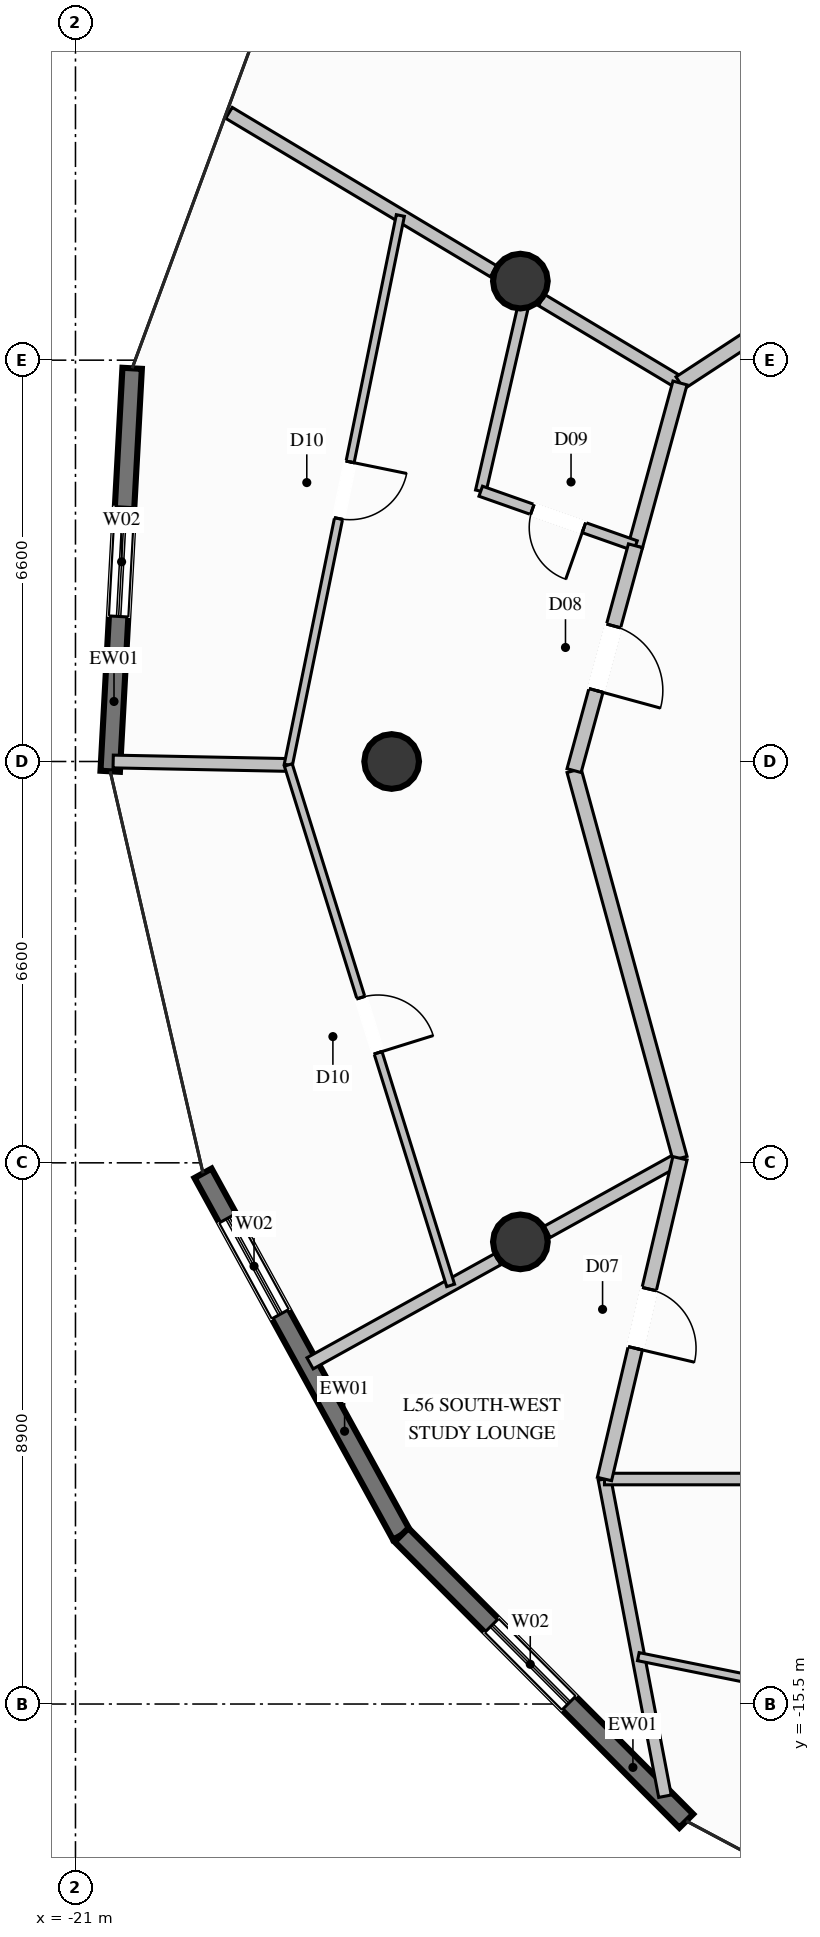
"""IFC4 building model, lengths in metres.
Left out: names, types, materials, properties, quantities, classifications, styles, units other than length and angle.
Written with IfcOpenShell. Run it as: python <this file> out.ifc"""

import sys

from ifc_helpers import new_model, si_unit, direction, frame, frame_2d, origin, origin_2d, place, context, subcontext, project, spatial, rectangle, circle, extrude, element, fill, save


model = new_model("IFC4")
c1 = context("Model", 3, precision=1e-05, world=origin(), true_north=direction((0.0, 1.0)))
c2 = subcontext(c1, "Body", "Model", "MODEL_VIEW")
j1 = project(units=[si_unit("LENGTHUNIT", "METRE"), si_unit("PLANEANGLEUNIT", "RADIAN")], contexts=[c1])
p1 = place(None, origin())
s1 = spatial("IfcSite", under=j1, at=p1, CompositionType="ELEMENT")
p2 = place(p1, origin())
s2 = spatial("IfcBuilding", under=s1, at=p2, CompositionType="ELEMENT")
p3 = place(p2, frame((0.0, 0.0, 216.4)))
s3 = spatial("IfcBuildingStorey", under=s2, at=p3, CompositionType="ELEMENT", Elevation=216.4)
for number, where, z_axis, x_axis in (
    (1, (-13.683, 7.9, 0.0), (0.0, 0.0, 1.0), (1.0, 0.0, 0.0)),
    (2, (-15.8, 0.0, 0.0), (0.0, 0.0, 1.0), (1.0, 0.0, 0.0)),
    (3, (-13.683, -7.9, 0.0), (0.0, 0.0, 1.0), (1.0, 0.0, 0.0)),
):
    element("IfcColumn", number, at=place(p3, frame(where, z_axis=z_axis, x_axis=x_axis)), inside=s3, PredefinedType="COLUMN", context=c2, shape_type="SweptSolid", body=[
        extrude(circle(Radius=0.45, at=origin_2d()), origin(), (0.0, 0.0, 1.0), 3.6),
    ])
p4 = place(p3, frame((-20.429, -0.161, 0.0), z_axis=(0.0, 0.0, 1.0), x_axis=(0.054369799723, 0.998520868524, 0.0)))
e4 = element("IfcWall", 4, at=p4, inside=s3, PredefinedType="SOLIDWALL", context=c2, shape_type="SweptSolid", body=[
    extrude(rectangle(XDim=6.637, YDim=0.32, at=frame_2d((3.318, 0.0))), origin(), (0.0, 0.0, 1.0), 3.36),
])
p5 = place(p4, frame((2.55, 0.0, 0.35)))
e5 = element("IfcOpeningElement", 5, at=p5, cuts=e4, PredefinedType="OPENING", context=c2, shape_type="SweptSolid", body=[
    extrude(rectangle(XDim=1.8, YDim=2.6, at=frame_2d((0.9, 1.3))), frame((0.0, 0.17, 0.0), z_axis=(0.0, -1.0, 0.0), x_axis=(1.0, 0.0, 0.0)), (0.0, 0.0, 1.0), 0.34),
])
p6 = place(p3, frame((-15.638, -12.72, 0.0), z_axis=(0.0, 0.0, 1.0), x_axis=(-0.481099413802, 0.876666044762, 0.0)))
e6 = element("IfcWall", 6, at=p6, inside=s3, PredefinedType="SOLIDWALL", context=c2, shape_type="SweptSolid", body=[
    extrude(rectangle(XDim=6.785, YDim=0.32, at=frame_2d((3.393, 0.0))), origin(), (0.0, 0.0, 1.0), 3.36),
])
p7 = place(p6, frame((4.142, 0.0, 0.35)))
e7 = element("IfcOpeningElement", 7, at=p7, cuts=e6, PredefinedType="OPENING", context=c2, shape_type="SweptSolid", body=[
    extrude(rectangle(XDim=1.8, YDim=2.6, at=frame_2d((0.9, 1.3))), frame((0.0, 0.17, 0.0), z_axis=(0.0, -1.0, 0.0), x_axis=(1.0, 0.0, 0.0)), (0.0, 0.0, 1.0), 0.34),
])
p8 = place(p3, frame((-10.955, -17.423, 0.0), z_axis=(0.0, 0.0, 1.0), x_axis=(-0.705578543979, 0.708631722601, 0.0)))
e8 = element("IfcWall", 8, at=p8, inside=s3, PredefinedType="SOLIDWALL", context=c2, shape_type="SweptSolid", body=[
    extrude(rectangle(XDim=6.637, YDim=0.32, at=frame_2d((3.318, 0.0))), origin(), (0.0, 0.0, 1.0), 3.36),
])
p9 = place(p8, frame((2.736, 0.0, 0.35)))
e9 = element("IfcOpeningElement", 9, at=p9, cuts=e8, PredefinedType="OPENING", context=c2, shape_type="SweptSolid", body=[
    extrude(rectangle(XDim=1.8, YDim=2.6, at=frame_2d((0.9, 1.3))), frame((0.0, 0.17, 0.0), z_axis=(0.0, -1.0, 0.0), x_axis=(1.0, 0.0, 0.0)), (0.0, 0.0, 1.0), 0.34),
])
p10 = place(p3, frame((-11.058, 6.225, 0.0), z_axis=(0.0, 0.0, 1.0), x_axis=(-0.857915260108, 0.513791209027, 0.0)))
e10 = element("IfcWall", 10, at=p10, inside=s3, PredefinedType="PARTITIONING", context=c2, shape_type="SweptSolid", body=[
    extrude(rectangle(XDim=2.651, YDim=0.21, at=frame_2d((1.325, 0.0))), origin(), (0.0, 0.0, 1.0), 2.801),
])
p11 = place(p3, frame((-14.124, 8.061, 0.0), z_axis=(0.0, 0.0, 1.0), x_axis=(-0.857951228024, 0.513731145963, 0.0)))
e11 = element("IfcWall", 11, at=p11, inside=s3, PredefinedType="PARTITIONING", context=c2, shape_type="SweptSolid", body=[
    extrude(rectangle(XDim=5.073, YDim=0.21, at=frame_2d((2.536, 0.0))), origin(), (0.0, 0.0, 1.0), 3.36),
])
p12 = place(p3, frame((-11.058, -6.525, 0.0), z_axis=(0.0, 0.0, 1.0), x_axis=(-0.874599471032, -0.484846125354, 0.0)))
e12 = element("IfcWall", 12, at=p12, inside=s3, PredefinedType="PARTITIONING", context=c2, shape_type="SweptSolid", body=[
    extrude(rectangle(XDim=2.498, YDim=0.21, at=frame_2d((1.249, 0.0))), origin(), (0.0, 0.0, 1.0), 2.801),
])
p13 = place(p3, frame((-14.056, -8.186, 0.0), z_axis=(0.0, 0.0, 1.0), x_axis=(-0.874590976559, -0.484861447965, 0.0)))
e13 = element("IfcWall", 13, at=p13, inside=s3, PredefinedType="PARTITIONING", context=c2, shape_type="SweptSolid", body=[
    extrude(rectangle(XDim=3.529, YDim=0.21, at=frame_2d((1.764, 0.0))), origin(), (0.0, 0.0, 1.0), 3.36),
])
p14 = place(p3, frame((-11.058, 6.225, 0.0), z_axis=(0.0, 0.0, 1.0), x_axis=(0.83693466485, 0.547302810857, 0.0)))
e14 = element("IfcWall", 14, at=p14, inside=s3, PredefinedType="PARTITIONING", context=c2, shape_type="SweptSolid", body=[
    extrude(rectangle(XDim=4.43, YDim=0.24, at=frame_2d((2.215, 0.0))), origin(), (0.0, 0.0, 1.0), 3.36),
])
p15 = place(p14, frame((1.715, 0.0, 0.0)))
e15 = element("IfcOpeningElement", 15, at=p15, cuts=e14, PredefinedType="OPENING", context=c2, shape_type="SweptSolid", body=[
    extrude(rectangle(XDim=1.0, YDim=2.2, at=frame_2d((0.5, 1.1))), frame((0.0, 0.13, 0.0), z_axis=(0.0, -1.0, 0.0), x_axis=(1.0, 0.0, 0.0)), (0.0, 0.0, 1.0), 0.26),
])
p16 = place(p3, frame((-11.058, 6.225, 0.0), z_axis=(0.0, 0.0, 1.0), x_axis=(-0.263645685939, -0.964619589416, 0.0)))
e16 = element("IfcWall", 16, at=p16, inside=s3, PredefinedType="PARTITIONING", context=c2, shape_type="SweptSolid", body=[
    extrude(rectangle(XDim=2.776, YDim=0.24, at=frame_2d((1.388, 0.0))), origin(), (0.0, 0.0, 1.0), 3.36),
])
p17 = place(p3, frame((-13.58, 7.735, 0.0), z_axis=(0.0, 0.0, 1.0), x_axis=(-0.223633839989, -0.974673230171, 0.0)))
e17 = element("IfcWall", 17, at=p17, inside=s3, PredefinedType="PLUMBINGWALL", context=c2, shape_type="SweptSolid", body=[
    extrude(rectangle(XDim=3.375, YDim=0.175, at=frame_2d((1.688, 0.0))), origin(), (0.0, 0.0, 1.0), 2.929),
])
p18 = place(p3, frame((-11.79, 3.547, 0.0), z_axis=(0.0, 0.0, 1.0), x_axis=(-0.943020392373, 0.332734938905, 0.0)))
e18 = element("IfcWall", 18, at=p18, inside=s3, PredefinedType="PLUMBINGWALL", context=c2, shape_type="SweptSolid", body=[
    extrude(rectangle(XDim=2.699, YDim=0.175, at=frame_2d((1.349, 0.0))), origin(), (0.0, 0.0, 1.0), 3.36),
])
p19 = place(p18, frame((0.899, 0.0, 0.0)))
e19 = element("IfcOpeningElement", 19, at=p19, cuts=e18, PredefinedType="OPENING", context=c2, shape_type="SweptSolid", body=[
    extrude(rectangle(XDim=0.9, YDim=2.1, at=frame_2d((0.45, 1.05))), frame((0.0, 0.098, 0.0), z_axis=(0.0, -1.0, 0.0), x_axis=(1.0, 0.0, 0.0)), (0.0, 0.0, 1.0), 0.195),
])
p20 = place(p3, frame((-17.5, -0.057, 0.0), z_axis=(0.0, 0.0, 1.0), x_axis=(-0.999804977258, 0.019748606282, 0.0)))
e20 = element("IfcWall", 20, at=p20, inside=s3, PredefinedType="PARTITIONING", context=c2, shape_type="SweptSolid", body=[
    extrude(rectangle(XDim=2.88, YDim=0.21, at=frame_2d((1.44, 0.0))), origin(), (0.0, 0.0, 1.0), 3.36),
])
p21 = place(p3, frame((-12.8, -0.15, 0.0), z_axis=(0.0, 0.0, 1.0), x_axis=(0.263583131966, -0.96463668422, 0.0)))
e21 = element("IfcWall", 21, at=p21, inside=s3, PredefinedType="PARTITIONING", context=c2, shape_type="SweptSolid", body=[
    extrude(rectangle(XDim=6.609, YDim=0.24, at=frame_2d((3.304, 0.0))), origin(), (0.0, 0.0, 1.0), 3.36),
])
p22 = place(p3, frame((-11.79, 3.547, 0.0), z_axis=(0.0, 0.0, 1.0), x_axis=(-0.263537818226, -0.964649064875, 0.0)))
e22 = element("IfcWall", 22, at=p22, inside=s3, PredefinedType="PARTITIONING", context=c2, shape_type="SweptSolid", body=[
    extrude(rectangle(XDim=3.833, YDim=0.24, at=frame_2d((1.916, 0.0))), origin(), (0.0, 0.0, 1.0), 3.36),
])
p23 = place(p22, frame((1.366, 0.0, 0.0)))
e23 = element("IfcOpeningElement", 23, at=p23, cuts=e22, PredefinedType="OPENING", context=c2, shape_type="SweptSolid", body=[
    extrude(rectangle(XDim=1.1, YDim=2.3, at=frame_2d((0.55, 1.15))), frame((0.0, 0.13, 0.0), z_axis=(0.0, -1.0, 0.0), x_axis=(1.0, 0.0, 0.0)), (0.0, 0.0, 1.0), 0.26),
])
p24 = place(p3, frame((-15.657, 8.979, 0.0), z_axis=(0.0, 0.0, 1.0), x_axis=(-0.199851606377, -0.97982617613, 0.0)))
e24 = element("IfcWall", 24, at=p24, inside=s3, PredefinedType="PARTITIONING", context=c2, shape_type="SweptSolid", body=[
    extrude(rectangle(XDim=9.222, YDim=0.135, at=frame_2d((4.611, 0.0))), origin(), (0.0, 0.0, 1.0), 3.36),
])
p25 = place(p24, frame((4.136, 0.0, 0.0)))
e25 = element("IfcOpeningElement", 25, at=p25, cuts=e24, PredefinedType="OPENING", context=c2, shape_type="SweptSolid", body=[
    extrude(rectangle(XDim=0.95, YDim=2.1, at=frame_2d((0.475, 1.05))), frame((0.0, 0.078, 0.0), z_axis=(0.0, -1.0, 0.0), x_axis=(1.0, 0.0, 0.0)), (0.0, 0.0, 1.0), 0.155),
])
p26 = place(p3, frame((-17.5, -0.057, 0.0), z_axis=(0.0, 0.0, 1.0), x_axis=(0.297788107715, -0.954631993442, 0.0)))
e26 = element("IfcWall", 26, at=p26, inside=s3, PredefinedType="PARTITIONING", context=c2, shape_type="SweptSolid", body=[
    extrude(rectangle(XDim=8.966, YDim=0.135, at=frame_2d((4.483, 0.0))), origin(), (0.0, 0.0, 1.0), 3.36),
])
p27 = place(p26, frame((4.008, 0.0, 0.0)))
e27 = element("IfcOpeningElement", 27, at=p27, cuts=e26, PredefinedType="OPENING", context=c2, shape_type="SweptSolid", body=[
    extrude(rectangle(XDim=0.95, YDim=2.1, at=frame_2d((0.475, 1.05))), frame((0.0, 0.078, 0.0), z_axis=(0.0, -1.0, 0.0), x_axis=(1.0, 0.0, 0.0)), (0.0, 0.0, 1.0), 0.155),
])
p28 = place(p3, frame((-12.3, -11.8, 0.0), z_axis=(0.0, 0.0, 1.0), x_axis=(0.187399426653, -0.982283795494, 0.0)))
e28 = element("IfcWall", 28, at=p28, inside=s3, PredefinedType="PARTITIONING", context=c2, shape_type="SweptSolid", body=[
    extrude(rectangle(XDim=5.31, YDim=0.21, at=frame_2d((2.655, 0.0))), origin(), (0.0, 0.0, 1.0), 3.36),
])
p29 = place(p3, frame((-12.3, -11.8, 0.0), z_axis=(0.0, 0.0, 1.0), x_axis=(1.0, 0.0, 0.0)))
e29 = element("IfcWall", 29, at=p29, inside=s3, PredefinedType="PARTITIONING", context=c2, shape_type="SweptSolid", body=[
    extrude(rectangle(XDim=12.3, YDim=0.19, at=frame_2d((6.15, 0.0))), origin(), (0.0, 0.0, 1.0), 3.36),
])
p30 = place(p29, frame((5.675, 0.0, 0.0)))
e30 = element("IfcOpeningElement", 30, at=p30, cuts=e29, PredefinedType="OPENING", context=c2, shape_type="SweptSolid", body=[
    extrude(rectangle(XDim=0.95, YDim=2.1, at=frame_2d((0.475, 1.05))), frame((0.0, 0.105, 0.0), z_axis=(0.0, -1.0, 0.0), x_axis=(1.0, 0.0, 0.0)), (0.0, 0.0, 1.0), 0.21),
])
p31 = place(p3, frame((-11.058, -6.525, 0.0), z_axis=(0.0, 0.0, 1.0), x_axis=(-0.229167390813, -0.973387028364, 0.0)))
e31 = element("IfcWall", 31, at=p31, inside=s3, PredefinedType="PARTITIONING", context=c2, shape_type="SweptSolid", body=[
    extrude(rectangle(XDim=5.419, YDim=0.24, at=frame_2d((2.71, 0.0))), origin(), (0.0, 0.0, 1.0), 3.36),
])
p32 = place(p31, frame((2.21, 0.0, 0.0)))
e32 = element("IfcOpeningElement", 32, at=p32, cuts=e31, PredefinedType="OPENING", context=c2, shape_type="SweptSolid", body=[
    extrude(rectangle(XDim=1.0, YDim=2.2, at=frame_2d((0.5, 1.1))), frame((0.0, 0.13, 0.0), z_axis=(0.0, -1.0, 0.0), x_axis=(1.0, 0.0, 0.0)), (0.0, 0.0, 1.0), 0.26),
])
p33 = place(p3, frame((-11.743, -14.721, 0.0), z_axis=(0.0, 0.0, 1.0), x_axis=(0.980290248813, -0.197562719363, 0.0)))
e33 = element("IfcWall", 33, at=p33, inside=s3, PredefinedType="PARTITIONING", context=c2, shape_type="SweptSolid", body=[
    extrude(rectangle(XDim=12.234, YDim=0.135, at=frame_2d((6.117, 0.0))), origin(), (0.0, 0.0, 1.0), 3.36),
])
p34 = place(p33, frame((5.642, 0.0, 0.0)))
e34 = element("IfcOpeningElement", 34, at=p34, cuts=e33, PredefinedType="OPENING", context=c2, shape_type="SweptSolid", body=[
    extrude(rectangle(XDim=0.95, YDim=2.1, at=frame_2d((0.475, 1.05))), frame((0.0, 0.078, 0.0), z_axis=(0.0, -1.0, 0.0), x_axis=(1.0, 0.0, 0.0)), (0.0, 0.0, 1.0), 0.155),
])
p35 = place(p5, origin())
e35 = element("IfcWindow", 35, at=p35, inside=s3, PartitioningType="SINGLE_PANEL", PredefinedType="WINDOW", context=c2, shape_type="SweptSolid", body=[
    extrude(rectangle(XDim=1.8, YDim=2.6, at=frame_2d((0.9, 1.3))), frame((0.0, 0.03, 0.0), z_axis=(0.0, -1.0, 0.0), x_axis=(1.0, 0.0, 0.0)), (0.0, 0.0, 1.0), 0.06),
])
fill(e5, e35)
p36 = place(p7, origin())
e36 = element("IfcWindow", 36, at=p36, inside=s3, PartitioningType="SINGLE_PANEL", PredefinedType="WINDOW", context=c2, shape_type="SweptSolid", body=[
    extrude(rectangle(XDim=1.8, YDim=2.6, at=frame_2d((0.9, 1.3))), frame((0.0, 0.03, 0.0), z_axis=(0.0, -1.0, 0.0), x_axis=(1.0, 0.0, 0.0)), (0.0, 0.0, 1.0), 0.06),
])
fill(e7, e36)
p37 = place(p9, origin())
e37 = element("IfcWindow", 37, at=p37, inside=s3, PartitioningType="SINGLE_PANEL", PredefinedType="WINDOW", context=c2, shape_type="SweptSolid", body=[
    extrude(rectangle(XDim=1.8, YDim=2.6, at=frame_2d((0.9, 1.3))), frame((0.0, 0.03, 0.0), z_axis=(0.0, -1.0, 0.0), x_axis=(1.0, 0.0, 0.0)), (0.0, 0.0, 1.0), 0.06),
])
fill(e9, e37)
p38 = place(p19, origin())
e38 = element("IfcDoor", 38, at=p38, inside=s3, OperationType="SINGLE_SWING_LEFT", PredefinedType="DOOR", context=c2, shape_type="SweptSolid", body=[
    extrude(rectangle(XDim=0.9, YDim=2.1, at=frame_2d((0.45, 1.05))), frame((0.0, 0.025, 0.0), z_axis=(0.0, -1.0, 0.0), x_axis=(1.0, 0.0, 0.0)), (0.0, 0.0, 1.0), 0.05),
])
fill(e19, e38)
p39 = place(p23, origin())
e39 = element("IfcDoor", 39, at=p39, inside=s3, OperationType="SINGLE_SWING_RIGHT", PredefinedType="DOOR", context=c2, shape_type="SweptSolid", body=[
    extrude(rectangle(XDim=1.1, YDim=2.3, at=frame_2d((0.55, 1.15))), frame((0.0, 0.025, 0.0), z_axis=(0.0, -1.0, 0.0), x_axis=(1.0, 0.0, 0.0)), (0.0, 0.0, 1.0), 0.05),
])
fill(e23, e39)
p40 = place(p25, origin())
e40 = element("IfcDoor", 40, at=p40, inside=s3, OperationType="SINGLE_SWING_LEFT", PredefinedType="DOOR", context=c2, shape_type="SweptSolid", body=[
    extrude(rectangle(XDim=0.95, YDim=2.1, at=frame_2d((0.475, 1.05))), frame((0.0, 0.025, 0.0), z_axis=(0.0, -1.0, 0.0), x_axis=(1.0, 0.0, 0.0)), (0.0, 0.0, 1.0), 0.05),
])
fill(e25, e40)
p41 = place(p27, origin())
e41 = element("IfcDoor", 41, at=p41, inside=s3, OperationType="SINGLE_SWING_RIGHT", PredefinedType="DOOR", context=c2, shape_type="SweptSolid", body=[
    extrude(rectangle(XDim=0.95, YDim=2.1, at=frame_2d((0.475, 1.05))), frame((0.0, 0.025, 0.0), z_axis=(0.0, -1.0, 0.0), x_axis=(1.0, 0.0, 0.0)), (0.0, 0.0, 1.0), 0.05),
])
fill(e27, e41)
p42 = place(p32, origin())
e42 = element("IfcDoor", 42, at=p42, inside=s3, OperationType="SINGLE_SWING_RIGHT", PredefinedType="DOOR", context=c2, shape_type="SweptSolid", body=[
    extrude(rectangle(XDim=1.0, YDim=2.2, at=frame_2d((0.5, 1.1))), frame((0.0, 0.025, 0.0), z_axis=(0.0, -1.0, 0.0), x_axis=(1.0, 0.0, 0.0)), (0.0, 0.0, 1.0), 0.05),
])
fill(e32, e42)
save(model, sys.argv[1])
